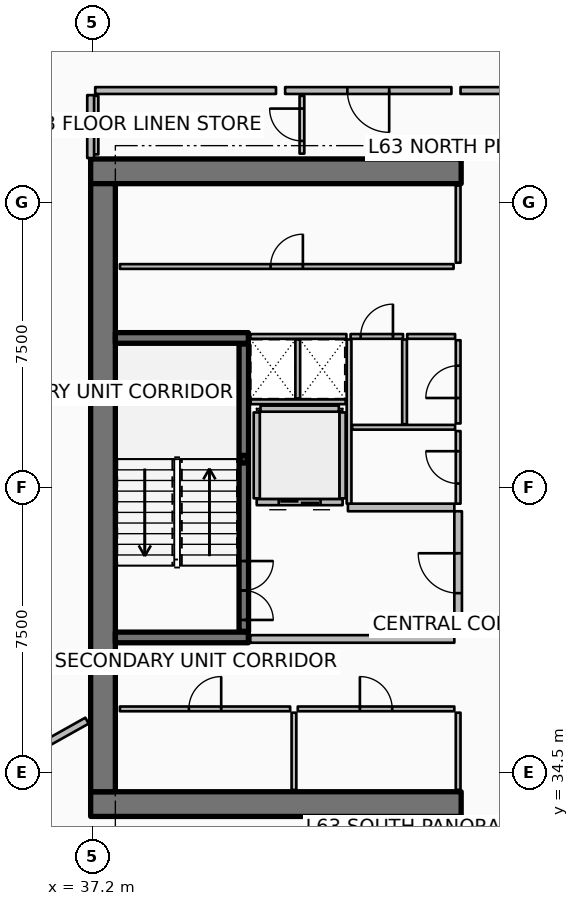
"""IFC4 building model, lengths in metres.
Left out: names, types, materials, properties, quantities, classifications, styles, units other than length and angle.
Written with IfcOpenShell. Run it as: python <this file> out.ifc"""

import sys

from ifc_helpers import new_model, si_unit, direction, frame, frame_2d, origin, origin_2d, place, context, subcontext, project, spatial, rectangle, hollow_rectangle, extrude, element, fill, save


model = new_model("IFC4")
c1 = context("Model", 3, precision=1e-05, world=origin(), true_north=direction((0.0, 1.0)))
c2 = subcontext(c1, "Body", "Model", "MODEL_VIEW")
j1 = project(units=[si_unit("LENGTHUNIT", "METRE"), si_unit("PLANEANGLEUNIT", "RADIAN")], contexts=[c1])
p1 = place(None, origin())
s1 = spatial("IfcSite", under=j1, at=p1, CompositionType="ELEMENT")
p2 = place(p1, origin())
s2 = spatial("IfcBuilding", under=s1, at=p2, CompositionType="ELEMENT")
p3 = place(p2, frame((0.0, 0.0, 252.1)))
s3 = spatial("IfcBuildingStorey", under=s2, at=p3, CompositionType="ELEMENT", Elevation=252.1)
for number, where, z_axis, x_axis in (
    (1, (37.15, 33.675, 0.0), (0.0, 0.0, 1.0), (1.0, 0.0, 0.0)),
    (2, (37.15, 50.325, 0.0), (0.0, 0.0, 1.0), (1.0, 0.0, 0.0)),
):
    element("IfcWall", number, at=place(p3, frame(where, z_axis=z_axis, x_axis=x_axis)), inside=s3, PredefinedType="SHEAR", context=c2, shape_type="SweptSolid", body=[
        extrude(rectangle(XDim=9.75, YDim=0.65, at=frame_2d((4.875, 0.0))), origin(), (0.0, 0.0, 1.0), 3.85),
    ])
p4 = place(p3, frame((37.475, 34.0, 0.0), z_axis=(0.0, 0.0, 1.0), x_axis=(0.0, 1.0, 0.0)))
e3 = element("IfcWall", 3, at=p4, inside=s3, PredefinedType="SHEAR", context=c2, shape_type="SweptSolid", body=[
    extrude(rectangle(XDim=16.0, YDim=0.65, at=frame_2d((8.0, 0.0))), origin(), (0.0, 0.0, 1.0), 3.85),
])
for number, where, z_axis, x_axis in (
    (4, (37.8, 38.06, 0.0), (0.0, 0.0, 1.0), (1.0, 0.0, 0.0)),
    (5, (37.8, 45.94, 0.0), (0.0, 0.0, 1.0), (1.0, 0.0, 0.0)),
):
    element("IfcWall", number, at=place(p3, frame(where, z_axis=z_axis, x_axis=x_axis)), inside=s3, PredefinedType="SHEAR", context=c2, shape_type="SweptSolid", body=[
        extrude(rectangle(XDim=3.5, YDim=0.28, at=frame_2d((1.75, 0.0))), origin(), (0.0, 0.0, 1.0), 3.85),
    ])
p5 = place(p3, frame((41.18, 42.75, 0.0), z_axis=(0.0, 0.0, 1.0), x_axis=(1.0, 0.0, 0.0)))
e6 = element("IfcColumn", 6, at=p5, inside=s3, PredefinedType="COLUMN", context=c2, shape_type="SweptSolid", body=[
    extrude(hollow_rectangle(XDim=0.2, YDim=0.2, WallThickness=0.01, InnerFilletRadius=0.01, OuterFilletRadius=0.02, at=origin_2d()), origin(), (0.0, 0.0, 1.0), 1.72),
])
p6 = place(p3, frame((41.18, 38.22, 0.0), z_axis=(0.0, 0.0, 1.0), x_axis=(0.0, 1.0, 0.0)))
e7 = element("IfcWall", 7, at=p6, inside=s3, PredefinedType="SOLIDWALL", context=c2, shape_type="SweptSolid", body=[
    extrude(rectangle(XDim=7.56, YDim=0.25, at=frame_2d((3.78, 0.0))), origin(), (0.0, 0.0, 1.0), 3.59),
])
p7 = place(p6, frame((0.3, 0.0, 0.0)))
e8 = element("IfcOpeningElement", 8, at=p7, cuts=e7, PredefinedType="OPENING", context=c2, shape_type="SweptSolid", body=[
    extrude(rectangle(XDim=1.55, YDim=2.15, at=frame_2d((0.775, 1.075))), frame((0.0, 0.135, 0.0), z_axis=(0.0, -1.0, 0.0), x_axis=(1.0, 0.0, 0.0)), (0.0, 0.0, 1.0), 0.27),
])
p8 = place(p3, frame((43.78, 41.62, 0.0), z_axis=(0.0, 0.0, 1.0), x_axis=(-1.0, 0.0, 0.0)))
e9 = element("IfcWall", 9, at=p8, inside=s3, PredefinedType="PARTITIONING", context=c2, shape_type="SweptSolid", body=[
    extrude(rectangle(XDim=2.26, YDim=0.16, at=frame_2d((1.13, 0.0))), origin(), (0.0, 0.0, 1.0), 3.59),
])
p9 = place(p8, frame((0.58, 0.0, 0.0)))
e10 = element("IfcOpeningElement", 10, at=p9, cuts=e9, PredefinedType="OPENING", context=c2, shape_type="SweptSolid", body=[
    extrude(rectangle(XDim=1.1, YDim=2.1, at=frame_2d((0.55, 1.05))), frame((0.0, 0.09, 0.0), z_axis=(0.0, -1.0, 0.0), x_axis=(1.0, 0.0, 0.0)), (0.0, 0.0, 1.0), 0.18),
])
for number, where, z_axis, x_axis in (
    (11, (43.78, 41.72, 0.0), (0.0, 0.0, 1.0), (0.0, 1.0, 0.0)),
    (12, (41.52, 41.72, 0.0), (0.0, 0.0, 1.0), (0.0, 1.0, 0.0)),
):
    element("IfcWall", number, at=place(p3, frame(where, z_axis=z_axis, x_axis=x_axis)), inside=s3, PredefinedType="PARTITIONING", context=c2, shape_type="SweptSolid", body=[
        extrude(rectangle(XDim=2.26, YDim=0.16, at=frame_2d((1.13, 0.0))), origin(), (0.0, 0.0, 1.0), 3.59),
    ])
p10 = place(p3, frame((41.62, 44.08, 0.0), z_axis=(0.0, 0.0, 1.0), x_axis=(1.0, 0.0, 0.0)))
e13 = element("IfcWall", 13, at=p10, inside=s3, PredefinedType="PARTITIONING", context=c2, shape_type="SweptSolid", body=[
    extrude(rectangle(XDim=2.06, YDim=0.16, at=frame_2d((1.03, 0.0))), origin(), (0.0, 0.0, 1.0), 3.59),
])
for number, where, z_axis, x_axis in (
    (14, (46.82, 34.05, 0.0), (0.0, 0.0, 1.0), (0.0, 1.0, 0.0)),
    (15, (42.5, 34.05, 0.0), (0.0, 0.0, 1.0), (0.0, 1.0, 0.0)),
):
    element("IfcWall", number, at=place(p3, frame(where, z_axis=z_axis, x_axis=x_axis)), inside=s3, PredefinedType="PARTITIONING", context=c2, shape_type="SweptSolid", body=[
        extrude(rectangle(XDim=2.03, YDim=0.125, at=frame_2d((1.015, 0.0))), origin(), (0.0, 0.0, 1.0), 3.03),
    ])
p11 = place(p3, frame((37.92, 36.18, 0.0), z_axis=(0.0, 0.0, 1.0), x_axis=(1.0, 0.0, 0.0)))
e16 = element("IfcWall", 16, at=p11, inside=s3, PredefinedType="PARTITIONING", context=c2, shape_type="SweptSolid", body=[
    extrude(rectangle(XDim=4.48, YDim=0.125, at=frame_2d((2.24, 0.0))), origin(), (0.0, 0.0, 1.0), 3.03),
])
p12 = place(p11, frame((1.815, 0.0, 0.0)))
e17 = element("IfcOpeningElement", 17, at=p12, cuts=e16, PredefinedType="OPENING", context=c2, shape_type="SweptSolid", body=[
    extrude(rectangle(XDim=0.85, YDim=2.06, at=frame_2d((0.425, 1.03))), frame((0.0, 0.073, 0.0), z_axis=(0.0, -1.0, 0.0), x_axis=(1.0, 0.0, 0.0)), (0.0, 0.0, 1.0), 0.145),
])
p13 = place(p3, frame((42.6, 36.18, 0.0), z_axis=(0.0, 0.0, 1.0), x_axis=(1.0, 0.0, 0.0)))
e18 = element("IfcWall", 18, at=p13, inside=s3, PredefinedType="PARTITIONING", context=c2, shape_type="SweptSolid", body=[
    extrude(rectangle(XDim=4.12, YDim=0.125, at=frame_2d((2.06, 0.0))), origin(), (0.0, 0.0, 1.0), 3.03),
])
p14 = place(p13, frame((1.635, 0.0, 0.0)))
e19 = element("IfcOpeningElement", 19, at=p14, cuts=e18, PredefinedType="OPENING", context=c2, shape_type="SweptSolid", body=[
    extrude(rectangle(XDim=0.85, YDim=2.06, at=frame_2d((0.425, 1.03))), frame((0.0, 0.073, 0.0), z_axis=(0.0, -1.0, 0.0), x_axis=(1.0, 0.0, 0.0)), (0.0, 0.0, 1.0), 0.145),
])
p15 = place(p3, frame((46.82, 47.92, 0.0), z_axis=(0.0, 0.0, 1.0), x_axis=(0.0, 1.0, 0.0)))
e20 = element("IfcWall", 20, at=p15, inside=s3, PredefinedType="PARTITIONING", context=c2, shape_type="SweptSolid", body=[
    extrude(rectangle(XDim=2.03, YDim=0.125, at=frame_2d((1.015, 0.0))), origin(), (0.0, 0.0, 1.0), 3.03),
])
p16 = place(p3, frame((37.92, 47.82, 0.0), z_axis=(0.0, 0.0, 1.0), x_axis=(1.0, 0.0, 0.0)))
e21 = element("IfcWall", 21, at=p16, inside=s3, PredefinedType="PARTITIONING", context=c2, shape_type="SweptSolid", body=[
    extrude(rectangle(XDim=8.78, YDim=0.125, at=frame_2d((4.39, 0.0))), origin(), (0.0, 0.0, 1.0), 3.03),
])
p17 = place(p16, frame((3.965, 0.0, 0.0)))
e22 = element("IfcOpeningElement", 22, at=p17, cuts=e21, PredefinedType="OPENING", context=c2, shape_type="SweptSolid", body=[
    extrude(rectangle(XDim=0.85, YDim=2.06, at=frame_2d((0.425, 1.03))), frame((0.0, 0.073, 0.0), z_axis=(0.0, -1.0, 0.0), x_axis=(1.0, 0.0, 0.0)), (0.0, 0.0, 1.0), 0.145),
])
p18 = place(p3, frame((41.35, 38.02, 0.0), z_axis=(0.0, 0.0, 1.0), x_axis=(1.0, 0.0, 0.0)))
e23 = element("IfcWall", 23, at=p18, inside=s3, PredefinedType="PARTITIONING", context=c2, shape_type="SweptSolid", body=[
    extrude(rectangle(XDim=5.37, YDim=0.2, at=frame_2d((2.685, 0.0))), origin(), (0.0, 0.0, 1.0), 3.59),
])
p19 = place(p3, frame((43.92, 41.48, 0.0), z_axis=(0.0, 0.0, 1.0), x_axis=(1.0, 0.0, 0.0)))
e24 = element("IfcWall", 24, at=p19, inside=s3, PredefinedType="PARTITIONING", context=c2, shape_type="SweptSolid", body=[
    extrude(rectangle(XDim=2.8, YDim=0.2, at=frame_2d((1.4, 0.0))), origin(), (0.0, 0.0, 1.0), 3.59),
])
p20 = place(p3, frame((46.82, 38.12, 0.0), z_axis=(0.0, 0.0, 1.0), x_axis=(0.0, 1.0, 0.0)))
e25 = element("IfcWall", 25, at=p20, inside=s3, PredefinedType="PARTITIONING", context=c2, shape_type="SweptSolid", body=[
    extrude(rectangle(XDim=3.26, YDim=0.2, at=frame_2d((1.63, 0.0))), origin(), (0.0, 0.0, 1.0), 3.59),
])
p21 = place(p20, frame((1.105, 0.0, 0.0)))
e26 = element("IfcOpeningElement", 26, at=p21, cuts=e25, PredefinedType="OPENING", context=c2, shape_type="SweptSolid", body=[
    extrude(rectangle(XDim=1.05, YDim=2.1, at=frame_2d((0.525, 1.05))), frame((0.0, 0.11, 0.0), z_axis=(0.0, -1.0, 0.0), x_axis=(1.0, 0.0, 0.0)), (0.0, 0.0, 1.0), 0.22),
])
p22 = place(p3, frame((41.36, 44.26, 0.0), z_axis=(0.0, 0.0, 1.0), x_axis=(1.0, 0.0, 0.0)))
e27 = element("IfcWall", 27, at=p22, inside=s3, PredefinedType="PARTITIONING", context=c2, shape_type="SweptSolid", body=[
    extrude(rectangle(XDim=2.5, YDim=0.125, at=frame_2d((1.25, 0.0))), origin(), (0.0, 0.0, 1.0), 3.03),
])
p23 = place(p3, frame((42.6, 44.35, 0.0), z_axis=(0.0, 0.0, 1.0), x_axis=(0.0, 1.0, 0.0)))
e28 = element("IfcWall", 28, at=p23, inside=s3, PredefinedType="PARTITIONING", context=c2, shape_type="SweptSolid", body=[
    extrude(rectangle(XDim=1.55, YDim=0.125, at=frame_2d((0.775, 0.0))), origin(), (0.0, 0.0, 1.0), 3.03),
])
p24 = place(p3, frame((43.95, 41.58, 0.0), z_axis=(0.0, 0.0, 1.0), x_axis=(0.0, 1.0, 0.0)))
e29 = element("IfcWall", 29, at=p24, inside=s3, PredefinedType="PARTITIONING", context=c2, shape_type="SweptSolid", body=[
    extrude(rectangle(XDim=4.32, YDim=0.125, at=frame_2d((2.16, 0.0))), origin(), (0.0, 0.0, 1.0), 3.03),
])
p25 = place(p3, frame((44.03, 43.59, 0.0), z_axis=(0.0, 0.0, 1.0), x_axis=(1.0, 0.0, 0.0)))
e30 = element("IfcWall", 30, at=p25, inside=s3, PredefinedType="PARTITIONING", context=c2, shape_type="SweptSolid", body=[
    extrude(rectangle(XDim=2.71, YDim=0.125, at=frame_2d((1.355, 0.0))), origin(), (0.0, 0.0, 1.0), 3.03),
])
p26 = place(p3, frame((45.41, 43.67, 0.0), z_axis=(0.0, 0.0, 1.0), x_axis=(0.0, 1.0, 0.0)))
e31 = element("IfcWall", 31, at=p26, inside=s3, PredefinedType="PARTITIONING", context=c2, shape_type="SweptSolid", body=[
    extrude(rectangle(XDim=2.23, YDim=0.125, at=frame_2d((1.115, 0.0))), origin(), (0.0, 0.0, 1.0), 3.03),
])
p27 = place(p3, frame((46.82, 41.58, 0.0), z_axis=(0.0, 0.0, 1.0), x_axis=(0.0, 1.0, 0.0)))
e32 = element("IfcWall", 32, at=p27, inside=s3, PredefinedType="PARTITIONING", context=c2, shape_type="SweptSolid", body=[
    extrude(rectangle(XDim=1.91, YDim=0.125, at=frame_2d((0.955, 0.0))), origin(), (0.0, 0.0, 1.0), 3.03),
])
p28 = place(p27, frame((0.53, 0.0, 0.0)))
e33 = element("IfcOpeningElement", 33, at=p28, cuts=e32, PredefinedType="OPENING", context=c2, shape_type="SweptSolid", body=[
    extrude(rectangle(XDim=0.85, YDim=2.06, at=frame_2d((0.425, 1.03))), frame((0.0, 0.073, 0.0), z_axis=(0.0, -1.0, 0.0), x_axis=(1.0, 0.0, 0.0)), (0.0, 0.0, 1.0), 0.145),
])
p29 = place(p3, frame((46.82, 43.69, 0.0), z_axis=(0.0, 0.0, 1.0), x_axis=(0.0, 1.0, 0.0)))
e34 = element("IfcWall", 34, at=p29, inside=s3, PredefinedType="PARTITIONING", context=c2, shape_type="SweptSolid", body=[
    extrude(rectangle(XDim=2.19, YDim=0.125, at=frame_2d((1.095, 0.0))), origin(), (0.0, 0.0, 1.0), 3.03),
])
p30 = place(p29, frame((0.67, 0.0, 0.0)))
e35 = element("IfcOpeningElement", 35, at=p30, cuts=e34, PredefinedType="OPENING", context=c2, shape_type="SweptSolid", body=[
    extrude(rectangle(XDim=0.85, YDim=2.06, at=frame_2d((0.425, 1.03))), frame((0.0, 0.073, 0.0), z_axis=(0.0, -1.0, 0.0), x_axis=(1.0, 0.0, 0.0)), (0.0, 0.0, 1.0), 0.145),
])
p31 = place(p3, frame((41.35, 45.98, 0.0), z_axis=(0.0, 0.0, 1.0), x_axis=(1.0, 0.0, 0.0)))
e36 = element("IfcWall", 36, at=p31, inside=s3, PredefinedType="PARTITIONING", context=c2, shape_type="SweptSolid", body=[
    extrude(rectangle(XDim=2.53, YDim=0.125, at=frame_2d((1.265, 0.0))), origin(), (0.0, 0.0, 1.0), 3.03),
])
p32 = place(p3, frame((43.99, 45.98, 0.0), z_axis=(0.0, 0.0, 1.0), x_axis=(1.0, 0.0, 0.0)))
e37 = element("IfcWall", 37, at=p32, inside=s3, PredefinedType="PARTITIONING", context=c2, shape_type="SweptSolid", body=[
    extrude(rectangle(XDim=1.38, YDim=0.125, at=frame_2d((0.69, 0.0))), origin(), (0.0, 0.0, 1.0), 3.03),
])
p33 = place(p32, frame((0.265, 0.0, 0.0)))
e38 = element("IfcOpeningElement", 38, at=p33, cuts=e37, PredefinedType="OPENING", context=c2, shape_type="SweptSolid", body=[
    extrude(rectangle(XDim=0.85, YDim=2.06, at=frame_2d((0.425, 1.03))), frame((0.0, 0.073, 0.0), z_axis=(0.0, -1.0, 0.0), x_axis=(1.0, 0.0, 0.0)), (0.0, 0.0, 1.0), 0.145),
])
p34 = place(p3, frame((45.48, 45.98, 0.0), z_axis=(0.0, 0.0, 1.0), x_axis=(1.0, 0.0, 0.0)))
e39 = element("IfcWall", 39, at=p34, inside=s3, PredefinedType="PARTITIONING", context=c2, shape_type="SweptSolid", body=[
    extrude(rectangle(XDim=1.26, YDim=0.125, at=frame_2d((0.63, 0.0))), origin(), (0.0, 0.0, 1.0), 3.03),
])
p35 = place(p3, frame((37.29, 50.77, 0.0), z_axis=(0.0, 0.0, 1.0), x_axis=(0.0, 1.0, 0.0)))
e40 = element("IfcWall", 40, at=p35, inside=s3, PredefinedType="PARTITIONING", context=c2, shape_type="SweptSolid", body=[
    extrude(rectangle(XDim=1.54, YDim=0.125, at=frame_2d((0.77, 0.0))), origin(), (0.0, 0.0, 1.0), 3.03),
])
p36 = place(p3, frame((42.71, 50.79, 0.0), z_axis=(0.0, 0.0, 1.0), x_axis=(0.0, 1.0, 0.0)))
e41 = element("IfcWall", 41, at=p36, inside=s3, PredefinedType="PARTITIONING", context=c2, shape_type="SweptSolid", body=[
    extrude(rectangle(XDim=1.52, YDim=0.125, at=frame_2d((0.76, 0.0))), origin(), (0.0, 0.0, 1.0), 2.957),
])
p37 = place(p36, frame((0.335, 0.0, 0.0)))
e42 = element("IfcOpeningElement", 42, at=p37, cuts=e41, PredefinedType="OPENING", context=c2, shape_type="SweptSolid", body=[
    extrude(rectangle(XDim=0.85, YDim=2.06, at=frame_2d((0.425, 1.03))), frame((0.0, 0.073, 0.0), z_axis=(0.0, -1.0, 0.0), x_axis=(1.0, 0.0, 0.0)), (0.0, 0.0, 1.0), 0.145),
])
p38 = place(p3, frame((37.054, 35.87, 0.0), z_axis=(0.0, 0.0, 1.0), x_axis=(-0.872490186067, -0.488631635506, 0.0)))
e43 = element("IfcWall", 43, at=p38, inside=s3, PredefinedType="PARTITIONING", context=c2, shape_type="SweptSolid", body=[
    extrude(rectangle(XDim=17.884, YDim=0.18, at=frame_2d((8.942, 0.0))), origin(), (0.0, 0.0, 1.0), 2.957),
])
p39 = place(p3, frame((46.643, 52.45, 0.0), z_axis=(0.0, 0.0, 1.0), x_axis=(-1.0, 0.0, 0.0)))
e44 = element("IfcWall", 44, at=p39, inside=s3, PredefinedType="PARTITIONING", context=c2, shape_type="SweptSolid", body=[
    extrude(rectangle(XDim=4.376, YDim=0.18, at=frame_2d((2.188, 0.0))), origin(), (0.0, 0.0, 1.0), 2.957),
])
p40 = place(p39, frame((1.638, 0.0, 0.0)))
e45 = element("IfcOpeningElement", 45, at=p40, cuts=e44, PredefinedType="OPENING", context=c2, shape_type="SweptSolid", body=[
    extrude(rectangle(XDim=1.1, YDim=2.1, at=frame_2d((0.55, 1.05))), frame((0.0, 0.1, 0.0), z_axis=(0.0, -1.0, 0.0), x_axis=(1.0, 0.0, 0.0)), (0.0, 0.0, 1.0), 0.2),
])
p41 = place(p3, frame((50.827, 52.45, 0.0), z_axis=(0.0, 0.0, 1.0), x_axis=(-1.0, 0.0, 0.0)))
e46 = element("IfcWall", 46, at=p41, inside=s3, PredefinedType="PARTITIONING", context=c2, shape_type="SweptSolid", body=[
    extrude(rectangle(XDim=3.944, YDim=0.18, at=frame_2d((1.972, 0.0))), origin(), (0.0, 0.0, 1.0), 2.957),
])
p42 = place(p3, frame((42.028, 52.45, 0.0), z_axis=(0.0, 0.0, 1.0), x_axis=(-1.0, 0.0, 0.0)))
e47 = element("IfcWall", 47, at=p42, inside=s3, PredefinedType="PARTITIONING", context=c2, shape_type="SweptSolid", body=[
    extrude(rectangle(XDim=4.758, YDim=0.18, at=frame_2d((2.379, 0.0))), origin(), (0.0, 0.0, 1.0), 2.957),
])
p43 = place(p3, frame((37.15, 52.33, 0.0), z_axis=(0.0, 0.0, 1.0), x_axis=(0.0, -1.0, 0.0)))
e48 = element("IfcWall", 48, at=p43, inside=s3, PredefinedType="PARTITIONING", context=c2, shape_type="SweptSolid", body=[
    extrude(rectangle(XDim=1.656, YDim=0.18, at=frame_2d((0.828, 0.0))), origin(), (0.0, 0.0, 1.0), 2.957),
])
p44 = place(p3, frame((39.095, 57.681, 0.0), z_axis=(0.0, 0.0, 1.0), x_axis=(-0.760396866349, -0.649458702033, 0.0)))
e49 = element("IfcWall", 49, at=p44, inside=s3, PredefinedType="PARTITIONING", context=c2, shape_type="SweptSolid", body=[
    extrude(rectangle(XDim=6.824, YDim=0.125, at=frame_2d((3.412, 0.0))), origin(), (0.0, 0.0, 1.0), 2.957),
])
p45 = place(p44, frame((2.962, 0.0, 0.0)))
e50 = element("IfcOpeningElement", 50, at=p45, cuts=e49, PredefinedType="OPENING", context=c2, shape_type="SweptSolid", body=[
    extrude(rectangle(XDim=0.9, YDim=2.08, at=frame_2d((0.45, 1.04))), frame((0.0, 0.073, 0.0), z_axis=(0.0, -1.0, 0.0), x_axis=(1.0, 0.0, 0.0)), (0.0, 0.0, 1.0), 0.145),
])
p46 = place(p7, origin())
e51 = element("IfcDoor", 51, at=p46, inside=s3, OperationType="DOUBLE_DOOR_SINGLE_SWING", PredefinedType="DOOR", context=c2, shape_type="SweptSolid", body=[
    extrude(rectangle(XDim=1.55, YDim=2.15, at=frame_2d((0.775, 1.075))), frame((0.0, 0.025, 0.0), z_axis=(0.0, -1.0, 0.0), x_axis=(1.0, 0.0, 0.0)), (0.0, 0.0, 1.0), 0.05),
])
fill(e8, e51)
p47 = place(p9, origin())
e52 = element("IfcDoor", 52, at=p47, inside=s3, OperationType="DOUBLE_DOOR_SLIDING", PredefinedType="DOOR", context=c2, shape_type="SweptSolid", body=[
    extrude(rectangle(XDim=1.1, YDim=2.1, at=frame_2d((0.55, 1.05))), frame((0.0, 0.025, 0.0), z_axis=(0.0, -1.0, 0.0), x_axis=(1.0, 0.0, 0.0)), (0.0, 0.0, 1.0), 0.05),
])
fill(e10, e52)
p48 = place(p12, origin())
e53 = element("IfcDoor", 53, at=p48, inside=s3, OperationType="SINGLE_SWING_RIGHT", PredefinedType="DOOR", context=c2, shape_type="SweptSolid", body=[
    extrude(rectangle(XDim=0.85, YDim=2.06, at=frame_2d((0.425, 1.03))), frame((0.0, 0.025, 0.0), z_axis=(0.0, -1.0, 0.0), x_axis=(1.0, 0.0, 0.0)), (0.0, 0.0, 1.0), 0.05),
])
fill(e17, e53)
p49 = place(p14, origin())
e54 = element("IfcDoor", 54, at=p49, inside=s3, OperationType="SINGLE_SWING_LEFT", PredefinedType="DOOR", context=c2, shape_type="SweptSolid", body=[
    extrude(rectangle(XDim=0.85, YDim=2.06, at=frame_2d((0.425, 1.03))), frame((0.0, 0.025, 0.0), z_axis=(0.0, -1.0, 0.0), x_axis=(1.0, 0.0, 0.0)), (0.0, 0.0, 1.0), 0.05),
])
fill(e19, e54)
p50 = place(p17, origin())
e55 = element("IfcDoor", 55, at=p50, inside=s3, OperationType="SINGLE_SWING_RIGHT", PredefinedType="DOOR", context=c2, shape_type="SweptSolid", body=[
    extrude(rectangle(XDim=0.85, YDim=2.06, at=frame_2d((0.425, 1.03))), frame((0.0, 0.025, 0.0), z_axis=(0.0, -1.0, 0.0), x_axis=(1.0, 0.0, 0.0)), (0.0, 0.0, 1.0), 0.05),
])
fill(e22, e55)
p51 = place(p21, origin())
e56 = element("IfcDoor", 56, at=p51, inside=s3, OperationType="SINGLE_SWING_RIGHT", PredefinedType="DOOR", context=c2, shape_type="SweptSolid", body=[
    extrude(rectangle(XDim=1.05, YDim=2.1, at=frame_2d((0.525, 1.05))), frame((0.0, 0.025, 0.0), z_axis=(0.0, -1.0, 0.0), x_axis=(1.0, 0.0, 0.0)), (0.0, 0.0, 1.0), 0.05),
])
fill(e26, e56)
p52 = place(p28, origin())
e57 = element("IfcDoor", 57, at=p52, inside=s3, OperationType="SINGLE_SWING_RIGHT", PredefinedType="DOOR", context=c2, shape_type="SweptSolid", body=[
    extrude(rectangle(XDim=0.85, YDim=2.06, at=frame_2d((0.425, 1.03))), frame((0.0, 0.025, 0.0), z_axis=(0.0, -1.0, 0.0), x_axis=(1.0, 0.0, 0.0)), (0.0, 0.0, 1.0), 0.05),
])
fill(e33, e57)
p53 = place(p30, origin())
e58 = element("IfcDoor", 58, at=p53, inside=s3, OperationType="SINGLE_SWING_LEFT", PredefinedType="DOOR", context=c2, shape_type="SweptSolid", body=[
    extrude(rectangle(XDim=0.85, YDim=2.06, at=frame_2d((0.425, 1.03))), frame((0.0, 0.025, 0.0), z_axis=(0.0, -1.0, 0.0), x_axis=(1.0, 0.0, 0.0)), (0.0, 0.0, 1.0), 0.05),
])
fill(e35, e58)
p54 = place(p33, origin())
e59 = element("IfcDoor", 59, at=p54, inside=s3, OperationType="SINGLE_SWING_RIGHT", PredefinedType="DOOR", context=c2, shape_type="SweptSolid", body=[
    extrude(rectangle(XDim=0.85, YDim=2.06, at=frame_2d((0.425, 1.03))), frame((0.0, 0.025, 0.0), z_axis=(0.0, -1.0, 0.0), x_axis=(1.0, 0.0, 0.0)), (0.0, 0.0, 1.0), 0.05),
])
fill(e38, e59)
p55 = place(p37, origin())
e60 = element("IfcDoor", 60, at=p55, inside=s3, OperationType="SINGLE_SWING_RIGHT", PredefinedType="DOOR", context=c2, shape_type="SweptSolid", body=[
    extrude(rectangle(XDim=0.85, YDim=2.06, at=frame_2d((0.425, 1.03))), frame((0.0, 0.025, 0.0), z_axis=(0.0, -1.0, 0.0), x_axis=(1.0, 0.0, 0.0)), (0.0, 0.0, 1.0), 0.05),
])
fill(e42, e60)
p56 = place(p40, origin())
e61 = element("IfcDoor", 61, at=p56, inside=s3, OperationType="SINGLE_SWING_LEFT", PredefinedType="DOOR", context=c2, shape_type="SweptSolid", body=[
    extrude(rectangle(XDim=1.1, YDim=2.1, at=frame_2d((0.55, 1.05))), frame((0.0, 0.025, 0.0), z_axis=(0.0, -1.0, 0.0), x_axis=(1.0, 0.0, 0.0)), (0.0, 0.0, 1.0), 0.05),
])
fill(e45, e61)
save(model, sys.argv[1])
